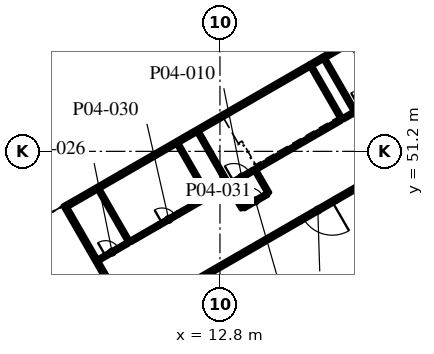
"""IFC4 building model, lengths in metres.
Left out: names, types, materials, properties, quantities, classifications, styles, units other than length and angle.
Written with IfcOpenShell. Run it as: python <this file> out.ifc"""

import sys

from ifc_helpers import new_model, si_unit, direction, frame, frame_2d, origin, place, context, subcontext, project, spatial, rectangle, extrude, element, fill, save


model = new_model("IFC4")
c1 = context("Model", 3, precision=1e-05, world=origin(), true_north=direction((0.0, 1.0)))
c2 = subcontext(c1, "Body", "Model", "MODEL_VIEW")
j1 = project(units=[si_unit("LENGTHUNIT", "METRE"), si_unit("PLANEANGLEUNIT", "RADIAN")], contexts=[c1])
p1 = place(None, origin())
s1 = spatial("IfcSite", under=j1, at=p1, CompositionType="ELEMENT")
p2 = place(p1, origin())
s2 = spatial("IfcBuilding", under=s1, at=p2, CompositionType="ELEMENT")
p3 = place(p2, frame((0.0, 0.0, 21.6)))
s3 = spatial("IfcBuildingStorey", under=s2, at=p3, CompositionType="ELEMENT", Elevation=21.6)
p4 = place(p3, frame((6.875, 40.198, 0.0), z_axis=(0.0, 0.0, 1.0), x_axis=(-0.499999331568, 0.866025789703, 0.0)))
e1 = element("IfcWall", 1, at=p4, inside=s3, PredefinedType="SOLIDWALL", context=c2, shape_type="SweptSolid", body=[
    extrude(rectangle(XDim=8.625, YDim=0.25, at=frame_2d((4.312, 0.0))), origin(), (0.0, 0.0, 1.0), 4.5),
])
p5 = place(p3, frame((6.983, 40.26, 0.0), z_axis=(0.0, 0.0, 1.0), x_axis=(0.866017240552, 0.500014138866, 0.0)))
e2 = element("IfcWall", 2, at=p5, inside=s3, PredefinedType="SOLIDWALL", context=c2, shape_type="SweptSolid", body=[
    extrude(rectangle(XDim=12.8, YDim=0.25, at=frame_2d((6.4, 0.0))), origin(), (0.0, 0.0, 1.0), 4.5),
])
p6 = place(p3, frame((20.407, 48.01, 0.0), z_axis=(0.0, 0.0, 1.0), x_axis=(-0.866059108428, -0.4999416173, 0.0)))
e3 = element("IfcWall", 3, at=p6, inside=s3, PredefinedType="SOLIDWALL", context=c2, shape_type="SweptSolid", body=[
    extrude(rectangle(XDim=2.7, YDim=0.25, at=frame_2d((1.35, 0.0))), origin(), (0.0, 0.0, 1.0), 4.5),
])
p7 = place(p6, frame((0.25, 0.0, 0.0)))
e4 = element("IfcOpeningElement", 4, at=p7, cuts=e3, PredefinedType="OPENING", context=c2, shape_type="SweptSolid", body=[
    extrude(rectangle(XDim=2.2, YDim=2.1, at=frame_2d((1.1, 1.05))), frame((0.0, 0.135, 0.0), z_axis=(0.0, -1.0, 0.0), x_axis=(1.0, 0.0, 0.0)), (0.0, 0.0, 1.0), 0.27),
])
p8 = place(p3, frame((20.407, 48.01, 0.0), z_axis=(0.0, 0.0, 1.0), x_axis=(0.866013532718, 0.500020560727, 0.0)))
e5 = element("IfcWall", 5, at=p8, inside=s3, PredefinedType="SOLIDWALL", context=c2, shape_type="SweptSolid", body=[
    extrude(rectangle(XDim=6.9, YDim=0.25, at=frame_2d((3.45, 0.0))), origin(), (0.0, 0.0, 1.0), 4.5),
])
p9 = place(p3, frame((2.733, 47.622, 0.0), z_axis=(0.0, 0.0, 1.0), x_axis=(0.866010060309, 0.500026574738, 0.0)))
e6 = element("IfcWall", 6, at=p9, inside=s3, PredefinedType="SOLIDWALL", context=c2, shape_type="SweptSolid", body=[
    extrude(rectangle(XDim=4.1, YDim=0.25, at=frame_2d((2.05, 0.0))), origin(), (0.0, 0.0, 1.0), 4.5),
])
p10 = place(p3, frame((6.284, 49.672, 0.0), z_axis=(0.0, 0.0, 1.0), x_axis=(0.866047370643, 0.499961950354, 0.0)))
e7 = element("IfcWall", 7, at=p10, inside=s3, PredefinedType="SOLIDWALL", context=c2, shape_type="SweptSolid", body=[
    extrude(rectangle(XDim=2.5, YDim=0.25, at=frame_2d((1.25, 0.0))), origin(), (0.0, 0.0, 1.0), 4.5),
])
p11 = place(p10, frame((0.25, 0.0, 0.9)))
e8 = element("IfcOpeningElement", 8, at=p11, cuts=e7, PredefinedType="OPENING", context=c2, shape_type="SweptSolid", body=[
    extrude(rectangle(XDim=2.0, YDim=1.8, at=frame_2d((1.0, 0.9))), frame((0.0, 0.135, 0.0), z_axis=(0.0, -1.0, 0.0), x_axis=(1.0, 0.0, 0.0)), (0.0, 0.0, 1.0), 0.27),
])
p12 = place(p3, frame((8.449, 50.922, 0.0), z_axis=(0.0, 0.0, 1.0), x_axis=(0.866026377112, 0.499998314143, 0.0)))
e9 = element("IfcWall", 9, at=p12, inside=s3, PredefinedType="SOLIDWALL", context=c2, shape_type="SweptSolid", body=[
    extrude(rectangle(XDim=11.9, YDim=0.25, at=frame_2d((5.95, 0.0))), origin(), (0.0, 0.0, 1.0), 4.5),
])
p13 = place(p3, frame((19.621, 57.372, 0.0), z_axis=(0.0, 0.0, 1.0), x_axis=(0.866021068297, 0.500007509209, 0.0)))
e10 = element("IfcWall", 10, at=p13, inside=s3, PredefinedType="SOLIDWALL", context=c2, shape_type="SweptSolid", body=[
    extrude(rectangle(XDim=8.6, YDim=0.25, at=frame_2d((4.3, 0.0))), origin(), (0.0, 0.0, 1.0), 4.5),
])
p14 = place(p3, frame((18.755, 56.872, 0.0), z_axis=(0.0, 0.0, 1.0), x_axis=(0.866010750942, 0.50002537861, 0.0)))
e11 = element("IfcWall", 11, at=p14, inside=s3, PredefinedType="SOLIDWALL", context=c2, shape_type="SweptSolid", body=[
    extrude(rectangle(XDim=1.0, YDim=0.25, at=frame_2d((0.5, 0.0))), origin(), (0.0, 0.0, 1.0), 4.5),
])
p15 = place(p3, frame((13.369, 49.0, 0.0), z_axis=(0.0, 0.0, 1.0), x_axis=(-0.50002537861, 0.866010750942, 0.0)))
e12 = element("IfcWall", 12, at=p15, inside=s3, PredefinedType="SOLIDWALL", context=c2, shape_type="SweptSolid", body=[
    extrude(rectangle(XDim=4.0, YDim=0.2, at=frame_2d((2.0, 0.0))), origin(), (0.0, 0.0, 1.0), 4.5),
])
for number, where, z_axis, x_axis in (
    (13, (20.817, 53.299, 0.0), (0.0, 0.0, 1.0), (-0.5, 0.866, 0.0)),
    (14, (21.683, 53.799, 0.0), (0.0, 0.0, 1.0), (-0.5, 0.866, 0.0)),
):
    element("IfcWall", number, at=place(p3, frame(where, z_axis=z_axis, x_axis=x_axis)), inside=s3, PredefinedType="SOLIDWALL", context=c2, shape_type="SweptSolid", body=[
        extrude(rectangle(XDim=4.0, YDim=0.2, at=frame_2d((2.0, 0.0))), origin(), (0.0, 0.0, 1.0), 4.5),
    ])
p16 = place(p3, frame((13.456, 49.049, 0.0), z_axis=(0.0, 0.0, 1.0), x_axis=(0.866036909293, 0.499980071345, 0.0)))
e15 = element("IfcWall", 15, at=p16, inside=s3, PredefinedType="SOLIDWALL", context=c2, shape_type="SweptSolid", body=[
    extrude(rectangle(XDim=1.75, YDim=0.2, at=frame_2d((0.875, 0.0))), origin(), (0.0, 0.0, 1.0), 4.5),
])
p17 = place(p16, frame((0.3, 0.0, 0.0)))
e16 = element("IfcOpeningElement", 16, at=p17, cuts=e15, PredefinedType="OPENING", context=c2, shape_type="SweptSolid", body=[
    extrude(rectangle(XDim=1.2, YDim=2.1, at=frame_2d((0.6, 1.05))), frame((0.0, 0.11, 0.0), z_axis=(0.0, -1.0, 0.0), x_axis=(1.0, 0.0, 0.0)), (0.0, 0.0, 1.0), 0.22),
])
p18 = place(p3, frame((14.972, 49.924, 0.0), z_axis=(0.0, 0.0, 1.0), x_axis=(0.86601134256, 0.500024353964, 0.0)))
e17 = element("IfcWall", 17, at=p18, inside=s3, PredefinedType="SOLIDWALL", context=c2, shape_type="SweptSolid", body=[
    extrude(rectangle(XDim=6.65, YDim=0.2, at=frame_2d((3.325, 0.0))), origin(), (0.0, 0.0, 1.0), 4.5),
])
for number, where, z_axis, x_axis in (
    (18, (14.27, 47.441, 0.0), (0.0, 0.0, 1.0), (-0.5, 0.866, 0.0)),
    (19, (16.001, 48.441, 0.0), (0.0, 0.0, 1.0), (-0.5, 0.866, 0.0)),
    (20, (22.583, 52.24, 0.0), (0.0, 0.0, 1.0), (-0.5, 0.866, 0.0)),
):
    element("IfcWall", number, at=place(p3, frame(where, z_axis=z_axis, x_axis=x_axis)), inside=s3, PredefinedType="PARTITIONING", context=c2, shape_type="SweptSolid", body=[
        extrude(rectangle(XDim=1.7, YDim=0.2, at=frame_2d((0.85, 0.0))), origin(), (0.0, 0.0, 1.0), 4.5),
    ])
p19 = place(p3, frame((14.356, 47.49, 0.0), z_axis=(0.0, 0.0, 1.0), x_axis=(0.865955154139, 0.50012165622, 0.0)))
e21 = element("IfcWall", 21, at=p19, inside=s3, PredefinedType="PARTITIONING", context=c2, shape_type="SweptSolid", body=[
    extrude(rectangle(XDim=1.8, YDim=0.2, at=frame_2d((0.9, 0.0))), origin(), (0.0, 0.0, 1.0), 4.5),
])
p20 = place(p19, frame((0.3, 0.0, 0.0)))
e22 = element("IfcOpeningElement", 22, at=p20, cuts=e21, PredefinedType="OPENING", context=c2, shape_type="SweptSolid", body=[
    extrude(rectangle(XDim=1.2, YDim=2.1, at=frame_2d((0.6, 1.05))), frame((0.0, 0.11, 0.0), z_axis=(0.0, -1.0, 0.0), x_axis=(1.0, 0.0, 0.0)), (0.0, 0.0, 1.0), 0.22),
])
p21 = place(p3, frame((6.831, 45.224, 0.0), z_axis=(0.0, 0.0, 1.0), x_axis=(-0.49999894854, 0.866026010844, 0.0)))
e23 = element("IfcWall", 23, at=p21, inside=s3, PredefinedType="PARTITIONING", context=c2, shape_type="SweptSolid", body=[
    extrude(rectangle(XDim=4.0, YDim=0.2, at=frame_2d((2.0, 0.0))), origin(), (0.0, 0.0, 1.0), 4.5),
])
p22 = place(p3, frame((4.796, 44.049, 0.0), z_axis=(0.0, 0.0, 1.0), x_axis=(0.866017533419, 0.500013631625, 0.0)))
e24 = element("IfcWall", 24, at=p22, inside=s3, PredefinedType="PARTITIONING", context=c2, shape_type="SweptSolid", body=[
    extrude(rectangle(XDim=2.25, YDim=0.2, at=frame_2d((1.125, 0.0))), origin(), (0.0, 0.0, 1.0), 4.5),
])
p23 = place(p22, frame((0.55, 0.0, 0.0)))
e25 = element("IfcOpeningElement", 25, at=p23, cuts=e24, PredefinedType="OPENING", context=c2, shape_type="SweptSolid", body=[
    extrude(rectangle(XDim=1.0, YDim=2.1, at=frame_2d((0.5, 1.05))), frame((0.0, 0.11, 0.0), z_axis=(0.0, -1.0, 0.0), x_axis=(1.0, 0.0, 0.0)), (0.0, 0.0, 1.0), 0.22),
])
p24 = place(p3, frame((12.027, 48.224, 0.0), z_axis=(0.0, 0.0, 1.0), x_axis=(-0.49999894854, 0.866026010844, 0.0)))
e26 = element("IfcWall", 26, at=p24, inside=s3, PredefinedType="PARTITIONING", context=c2, shape_type="SweptSolid", body=[
    extrude(rectangle(XDim=4.0, YDim=0.2, at=frame_2d((2.0, 0.0))), origin(), (0.0, 0.0, 1.0), 4.5),
])
p25 = place(p3, frame((6.917, 45.274, 0.0), z_axis=(0.0, 0.0, 1.0), x_axis=(0.866047553582, 0.499961633463, 0.0)))
e27 = element("IfcWall", 27, at=p25, inside=s3, PredefinedType="PARTITIONING", context=c2, shape_type="SweptSolid", body=[
    extrude(rectangle(XDim=2.15, YDim=0.2, at=frame_2d((1.075, 0.0))), origin(), (0.0, 0.0, 1.0), 4.5),
])
p26 = place(p3, frame((8.78, 46.349, 0.0), z_axis=(0.0, 0.0, 1.0), x_axis=(0.866031096941, 0.499990139034, 0.0)))
e28 = element("IfcWall", 28, at=p26, inside=s3, PredefinedType="PARTITIONING", context=c2, shape_type="SweptSolid", body=[
    extrude(rectangle(XDim=1.5, YDim=0.2, at=frame_2d((0.75, 0.0))), origin(), (0.0, 0.0, 1.0), 4.5),
])
p27 = place(p26, frame((0.25, 0.0, 0.0)))
e29 = element("IfcOpeningElement", 29, at=p27, cuts=e28, PredefinedType="OPENING", context=c2, shape_type="SweptSolid", body=[
    extrude(rectangle(XDim=1.0, YDim=2.1, at=frame_2d((0.5, 1.05))), frame((0.0, 0.11, 0.0), z_axis=(0.0, -1.0, 0.0), x_axis=(1.0, 0.0, 0.0)), (0.0, 0.0, 1.0), 0.22),
])
p28 = place(p3, frame((10.079, 47.099, 0.0), z_axis=(0.0, 0.0, 1.0), x_axis=(0.866019166195, 0.500010803666, 0.0)))
e30 = element("IfcWall", 30, at=p28, inside=s3, PredefinedType="PARTITIONING", context=c2, shape_type="SweptSolid", body=[
    extrude(rectangle(XDim=2.15, YDim=0.2, at=frame_2d((1.075, 0.0))), origin(), (0.0, 0.0, 1.0), 4.5),
])
p29 = place(p3, frame((12.114, 48.274, 0.0), z_axis=(0.0, 0.0, 1.0), x_axis=(0.866019956843, 0.50000943426, 0.0)))
e31 = element("IfcWall", 31, at=p29, inside=s3, PredefinedType="PARTITIONING", context=c2, shape_type="SweptSolid", body=[
    extrude(rectangle(XDim=1.35, YDim=0.2, at=frame_2d((0.675, 0.0))), origin(), (0.0, 0.0, 1.0), 4.5),
])
p30 = place(p29, frame((0.175, 0.0, 0.0)))
e32 = element("IfcOpeningElement", 32, at=p30, cuts=e31, PredefinedType="OPENING", context=c2, shape_type="SweptSolid", body=[
    extrude(rectangle(XDim=1.0, YDim=2.1, at=frame_2d((0.5, 1.05))), frame((0.0, 0.11, 0.0), z_axis=(0.0, -1.0, 0.0), x_axis=(1.0, 0.0, 0.0)), (0.0, 0.0, 1.0), 0.22),
])
p31 = place(p3, frame((20.904, 53.349, 0.0), z_axis=(0.0, 0.0, 1.0), x_axis=(0.865961984968, 0.500109828528, 0.0)))
e33 = element("IfcWall", 33, at=p31, inside=s3, PredefinedType="PARTITIONING", context=c2, shape_type="SweptSolid", body=[
    extrude(rectangle(XDim=0.8, YDim=0.2, at=frame_2d((0.4, 0.0))), origin(), (0.0, 0.0, 1.0), 4.5),
])
p32 = place(p7, origin())
e34 = element("IfcDoor", 34, at=p32, inside=s3, OperationType="DOUBLE_DOOR_SINGLE_SWING", PredefinedType="DOOR", context=c2, shape_type="SweptSolid", body=[
    extrude(rectangle(XDim=2.2, YDim=2.1, at=frame_2d((1.1, 1.05))), frame((0.0, 0.025, 0.0), z_axis=(0.0, -1.0, 0.0), x_axis=(1.0, 0.0, 0.0)), (0.0, 0.0, 1.0), 0.05),
])
fill(e4, e34)
p33 = place(p11, origin())
e35 = element("IfcWindow", 35, at=p33, inside=s3, PartitioningType="SINGLE_PANEL", PredefinedType="WINDOW", context=c2, shape_type="SweptSolid", body=[
    extrude(rectangle(XDim=2.0, YDim=1.8, at=frame_2d((1.0, 0.9))), frame((0.0, 0.03, 0.0), z_axis=(0.0, -1.0, 0.0), x_axis=(1.0, 0.0, 0.0)), (0.0, 0.0, 1.0), 0.06),
])
fill(e8, e35)
p34 = place(p17, origin())
e36 = element("IfcDoor", 36, at=p34, inside=s3, OperationType="SINGLE_SWING_LEFT", PredefinedType="DOOR", context=c2, shape_type="SweptSolid", body=[
    extrude(rectangle(XDim=1.2, YDim=2.1, at=frame_2d((0.6, 1.05))), frame((0.0, 0.025, 0.0), z_axis=(0.0, -1.0, 0.0), x_axis=(1.0, 0.0, 0.0)), (0.0, 0.0, 1.0), 0.05),
])
fill(e16, e36)
p35 = place(p20, origin())
e37 = element("IfcDoor", 37, at=p35, inside=s3, OperationType="SINGLE_SWING_LEFT", PredefinedType="DOOR", context=c2, shape_type="SweptSolid", body=[
    extrude(rectangle(XDim=1.2, YDim=2.1, at=frame_2d((0.6, 1.05))), frame((0.0, 0.025, 0.0), z_axis=(0.0, -1.0, 0.0), x_axis=(1.0, 0.0, 0.0)), (0.0, 0.0, 1.0), 0.05),
])
fill(e22, e37)
p36 = place(p23, origin())
e38 = element("IfcDoor", 38, at=p36, inside=s3, OperationType="SINGLE_SWING_LEFT", PredefinedType="DOOR", context=c2, shape_type="SweptSolid", body=[
    extrude(rectangle(XDim=1.0, YDim=2.1, at=frame_2d((0.5, 1.05))), frame((0.0, 0.025, 0.0), z_axis=(0.0, -1.0, 0.0), x_axis=(1.0, 0.0, 0.0)), (0.0, 0.0, 1.0), 0.05),
])
fill(e25, e38)
p37 = place(p27, origin())
e39 = element("IfcDoor", 39, at=p37, inside=s3, OperationType="SINGLE_SWING_LEFT", PredefinedType="DOOR", context=c2, shape_type="SweptSolid", body=[
    extrude(rectangle(XDim=1.0, YDim=2.1, at=frame_2d((0.5, 1.05))), frame((0.0, 0.025, 0.0), z_axis=(0.0, -1.0, 0.0), x_axis=(1.0, 0.0, 0.0)), (0.0, 0.0, 1.0), 0.05),
])
fill(e29, e39)
p38 = place(p30, origin())
e40 = element("IfcDoor", 40, at=p38, inside=s3, OperationType="SINGLE_SWING_LEFT", PredefinedType="DOOR", context=c2, shape_type="SweptSolid", body=[
    extrude(rectangle(XDim=1.0, YDim=2.1, at=frame_2d((0.5, 1.05))), frame((0.0, 0.025, 0.0), z_axis=(0.0, -1.0, 0.0), x_axis=(1.0, 0.0, 0.0)), (0.0, 0.0, 1.0), 0.05),
])
fill(e32, e40)
save(model, sys.argv[1])
